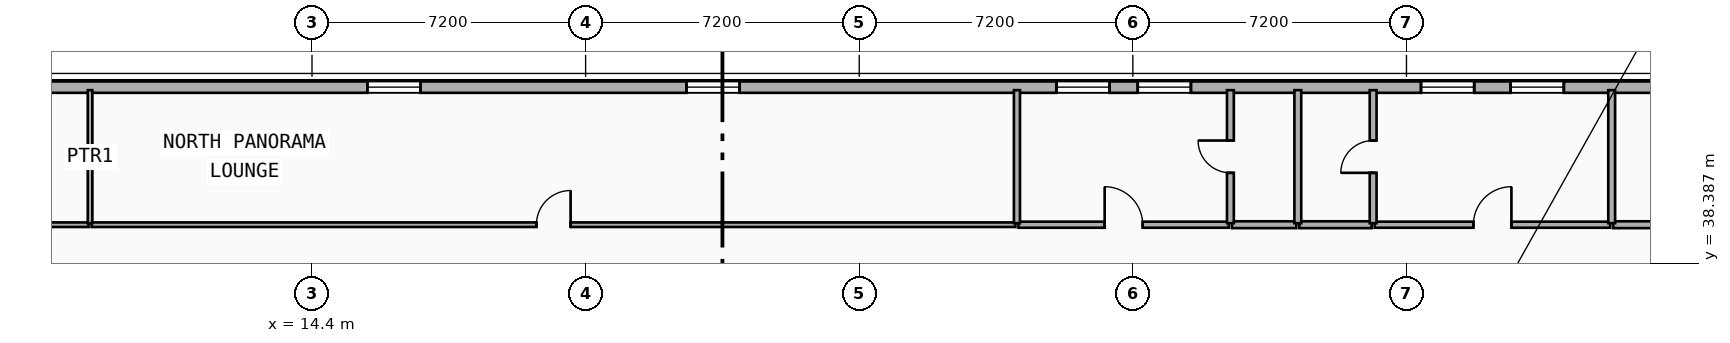
"""IFC4 building model, lengths in metres.
Left out: names, types, materials, properties, quantities, classifications, styles, units other than length and angle.
Written with IfcOpenShell. Run it as: python <this file> out.ifc"""

import sys

from ifc_helpers import new_model, si_unit, direction, frame, frame_2d, origin, place, context, subcontext, project, spatial, rectangle, extrude, element, fill, save


model = new_model("IFC4")
c1 = context("Model", 3, precision=1e-05, world=origin(), true_north=direction((0.0, 1.0)))
c2 = subcontext(c1, "Body", "Model", "MODEL_VIEW")
j1 = project(units=[si_unit("LENGTHUNIT", "METRE"), si_unit("PLANEANGLEUNIT", "RADIAN")], contexts=[c1])
p1 = place(None, origin())
s1 = spatial("IfcSite", under=j1, at=p1, CompositionType="ELEMENT")
p2 = place(p1, origin())
s2 = spatial("IfcBuilding", under=s1, at=p2, CompositionType="ELEMENT")
p3 = place(p2, frame((0.0, 0.0, 101.3)))
s3 = spatial("IfcBuildingStorey", under=s2, at=p3, CompositionType="ELEMENT", Elevation=101.3)
p4 = place(p3, frame((4.2, 43.02, 0.0), z_axis=(0.0, 0.0, 1.0), x_axis=(1.0, 0.0, 0.0)))
e1 = element("IfcWall", 1, at=p4, inside=s3, PredefinedType="SOLIDWALL", context=c2, shape_type="SweptSolid", body=[
    extrude(rectangle(XDim=49.2, YDim=0.3, at=frame_2d((24.6, 0.0))), origin(), (0.0, 0.0, 1.0), 3.24),
])
p5 = place(p4, frame((11.657, 0.0, 0.85)))
e2 = element("IfcOpeningElement", 2, at=p5, cuts=e1, PredefinedType="OPENING", context=c2, shape_type="SweptSolid", body=[
    extrude(rectangle(XDim=1.4, YDim=1.8, at=frame_2d((0.7, 0.9))), frame((0.0, 0.16, 0.0), z_axis=(0.0, -1.0, 0.0), x_axis=(1.0, 0.0, 0.0)), (0.0, 0.0, 1.0), 0.32),
])
p6 = place(p4, frame((20.053, 0.0, 0.85)))
e3 = element("IfcOpeningElement", 3, at=p6, cuts=e1, PredefinedType="OPENING", context=c2, shape_type="SweptSolid", body=[
    extrude(rectangle(XDim=1.4, YDim=1.8, at=frame_2d((0.7, 0.9))), frame((0.0, 0.16, 0.0), z_axis=(0.0, -1.0, 0.0), x_axis=(1.0, 0.0, 0.0)), (0.0, 0.0, 1.0), 0.32),
])
p7 = place(p4, frame((29.789, 0.0, 0.85)))
e4 = element("IfcOpeningElement", 4, at=p7, cuts=e1, PredefinedType="OPENING", context=c2, shape_type="SweptSolid", body=[
    extrude(rectangle(XDim=1.4, YDim=1.8, at=frame_2d((0.7, 0.9))), frame((0.0, 0.16, 0.0), z_axis=(0.0, -1.0, 0.0), x_axis=(1.0, 0.0, 0.0)), (0.0, 0.0, 1.0), 0.32),
])
p8 = place(p4, frame((31.928, 0.0, 0.85)))
e5 = element("IfcOpeningElement", 5, at=p8, cuts=e1, PredefinedType="OPENING", context=c2, shape_type="SweptSolid", body=[
    extrude(rectangle(XDim=1.4, YDim=1.8, at=frame_2d((0.7, 0.9))), frame((0.0, 0.16, 0.0), z_axis=(0.0, -1.0, 0.0), x_axis=(1.0, 0.0, 0.0)), (0.0, 0.0, 1.0), 0.32),
])
p9 = place(p4, frame((39.382, 0.0, 0.85)))
e6 = element("IfcOpeningElement", 6, at=p9, cuts=e1, PredefinedType="OPENING", context=c2, shape_type="SweptSolid", body=[
    extrude(rectangle(XDim=1.4, YDim=1.8, at=frame_2d((0.7, 0.9))), frame((0.0, 0.16, 0.0), z_axis=(0.0, -1.0, 0.0), x_axis=(1.0, 0.0, 0.0)), (0.0, 0.0, 1.0), 0.32),
])
p10 = place(p4, frame((41.741, 0.0, 0.85)))
e7 = element("IfcOpeningElement", 7, at=p10, cuts=e1, PredefinedType="OPENING", context=c2, shape_type="SweptSolid", body=[
    extrude(rectangle(XDim=1.4, YDim=1.8, at=frame_2d((0.7, 0.9))), frame((0.0, 0.16, 0.0), z_axis=(0.0, -1.0, 0.0), x_axis=(1.0, 0.0, 0.0)), (0.0, 0.0, 1.0), 0.32),
])
p11 = place(p4, frame((47.115, 0.0, 0.85)))
e8 = element("IfcOpeningElement", 8, at=p11, cuts=e1, PredefinedType="OPENING", context=c2, shape_type="SweptSolid", body=[
    extrude(rectangle(XDim=1.4, YDim=1.8, at=frame_2d((0.7, 0.9))), frame((0.0, 0.16, 0.0), z_axis=(0.0, -1.0, 0.0), x_axis=(1.0, 0.0, 0.0)), (0.0, 0.0, 1.0), 0.32),
])
p12 = place(p3, frame((0.26, 39.4, 0.0), z_axis=(0.0, 0.0, 1.0), x_axis=(1.0, 0.0, 0.0)))
e9 = element("IfcWall", 9, at=p12, inside=s3, PredefinedType="PARTITIONING", context=c2, shape_type="SweptSolid", body=[
    extrude(rectangle(XDim=8.26, YDim=0.12, at=frame_2d((4.13, 0.0))), origin(), (0.0, 0.0, 1.0), 3.24),
])
p13 = place(p12, frame((3.68, 0.0, 0.0)))
e10 = element("IfcOpeningElement", 10, at=p13, cuts=e9, PredefinedType="OPENING", context=c2, shape_type="SweptSolid", body=[
    extrude(rectangle(XDim=0.9, YDim=2.1, at=frame_2d((0.45, 1.05))), frame((0.0, 0.07, 0.0), z_axis=(0.0, -1.0, 0.0), x_axis=(1.0, 0.0, 0.0)), (0.0, 0.0, 1.0), 0.14),
])
p14 = place(p3, frame((8.6, 39.4, 0.0), z_axis=(0.0, 0.0, 1.0), x_axis=(1.0, 0.0, 0.0)))
e11 = element("IfcWall", 11, at=p14, inside=s3, PredefinedType="PARTITIONING", context=c2, shape_type="SweptSolid", body=[
    extrude(rectangle(XDim=24.31, YDim=0.12, at=frame_2d((12.155, 0.0))), origin(), (0.0, 0.0, 1.0), 3.24),
])
p15 = place(p14, frame((11.705, 0.0, 0.0)))
e12 = element("IfcOpeningElement", 12, at=p15, cuts=e11, PredefinedType="OPENING", context=c2, shape_type="SweptSolid", body=[
    extrude(rectangle(XDim=0.9, YDim=2.1, at=frame_2d((0.45, 1.05))), frame((0.0, 0.07, 0.0), z_axis=(0.0, -1.0, 0.0), x_axis=(1.0, 0.0, 0.0)), (0.0, 0.0, 1.0), 0.14),
])
p16 = place(p3, frame((32.99, 39.4, 0.0), z_axis=(0.0, 0.0, 1.0), x_axis=(1.0, 0.0, 0.0)))
e13 = element("IfcWall", 13, at=p16, inside=s3, PredefinedType="PARTITIONING", context=c2, shape_type="SweptSolid", body=[
    extrude(rectangle(XDim=5.537, YDim=0.16, at=frame_2d((2.769, 0.0))), origin(), (0.0, 0.0, 1.0), 3.24),
])
p17 = place(p16, frame((2.269, 0.0, 0.0)))
e14 = element("IfcOpeningElement", 14, at=p17, cuts=e13, PredefinedType="OPENING", context=c2, shape_type="SweptSolid", body=[
    extrude(rectangle(XDim=1.0, YDim=2.15, at=frame_2d((0.5, 1.075))), frame((0.0, 0.09, 0.0), z_axis=(0.0, -1.0, 0.0), x_axis=(1.0, 0.0, 0.0)), (0.0, 0.0, 1.0), 0.18),
])
p18 = place(p3, frame((38.607, 39.4, 0.0), z_axis=(0.0, 0.0, 1.0), x_axis=(1.0, 0.0, 0.0)))
e15 = element("IfcWall", 15, at=p18, inside=s3, PredefinedType="PLUMBINGWALL", context=c2, shape_type="SweptSolid", body=[
    extrude(rectangle(XDim=1.694, YDim=0.18, at=frame_2d((0.847, 0.0))), origin(), (0.0, 0.0, 1.0), 3.24),
])
p19 = place(p3, frame((42.363, 39.4, 0.0), z_axis=(0.0, 0.0, 1.0), x_axis=(1.0, 0.0, 0.0)))
e16 = element("IfcWall", 16, at=p19, inside=s3, PredefinedType="PARTITIONING", context=c2, shape_type="SweptSolid", body=[
    extrude(rectangle(XDim=6.197, YDim=0.16, at=frame_2d((3.099, 0.0))), origin(), (0.0, 0.0, 1.0), 3.24),
])
p20 = place(p19, frame((2.598, 0.0, 0.0)))
e17 = element("IfcOpeningElement", 17, at=p20, cuts=e16, PredefinedType="OPENING", context=c2, shape_type="SweptSolid", body=[
    extrude(rectangle(XDim=1.0, YDim=2.15, at=frame_2d((0.5, 1.075))), frame((0.0, 0.09, 0.0), z_axis=(0.0, -1.0, 0.0), x_axis=(1.0, 0.0, 0.0)), (0.0, 0.0, 1.0), 0.18),
])
p21 = place(p3, frame((40.381, 39.4, 0.0), z_axis=(0.0, 0.0, 1.0), x_axis=(1.0, 0.0, 0.0)))
e18 = element("IfcWall", 18, at=p21, inside=s3, PredefinedType="PLUMBINGWALL", context=c2, shape_type="SweptSolid", body=[
    extrude(rectangle(XDim=1.902, YDim=0.18, at=frame_2d((0.951, 0.0))), origin(), (0.0, 0.0, 1.0), 3.24),
])
p22 = place(p3, frame((48.64, 39.4, 0.0), z_axis=(0.0, 0.0, 1.0), x_axis=(1.0, 0.0, 0.0)))
e19 = element("IfcWall", 19, at=p22, inside=s3, PredefinedType="PLUMBINGWALL", context=c2, shape_type="SweptSolid", body=[
    extrude(rectangle(XDim=1.97, YDim=0.18, at=frame_2d((0.985, 0.0))), origin(), (0.0, 0.0, 1.0), 3.24),
])
p23 = place(p3, frame((8.56, 39.44, 0.0), z_axis=(0.0, 0.0, 1.0), x_axis=(0.0, 1.0, 0.0)))
e20 = element("IfcWall", 20, at=p23, inside=s3, PredefinedType="PARTITIONING", context=c2, shape_type="SweptSolid", body=[
    extrude(rectangle(XDim=3.5, YDim=0.12, at=frame_2d((1.75, 0.0))), origin(), (0.0, 0.0, 1.0), 3.24),
])
p24 = place(p3, frame((32.95, 39.44, 0.0), z_axis=(0.0, 0.0, 1.0), x_axis=(0.0, 1.0, 0.0)))
e21 = element("IfcWall", 21, at=p24, inside=s3, PredefinedType="PARTITIONING", context=c2, shape_type="SweptSolid", body=[
    extrude(rectangle(XDim=3.5, YDim=0.16, at=frame_2d((1.75, 0.0))), origin(), (0.0, 0.0, 1.0), 3.24),
])
p25 = place(p3, frame((38.567, 39.44, 0.0), z_axis=(0.0, 0.0, 1.0), x_axis=(0.0, 1.0, 0.0)))
e22 = element("IfcWall", 22, at=p25, inside=s3, PredefinedType="PLUMBINGWALL", context=c2, shape_type="SweptSolid", body=[
    extrude(rectangle(XDim=3.5, YDim=0.18, at=frame_2d((1.75, 0.0))), origin(), (0.0, 0.0, 1.0), 3.24),
])
p26 = place(p25, frame((1.325, 0.0, 0.0)))
e23 = element("IfcOpeningElement", 23, at=p26, cuts=e22, PredefinedType="OPENING", context=c2, shape_type="SweptSolid", body=[
    extrude(rectangle(XDim=0.85, YDim=2.1, at=frame_2d((0.425, 1.05))), frame((0.0, 0.1, 0.0), z_axis=(0.0, -1.0, 0.0), x_axis=(1.0, 0.0, 0.0)), (0.0, 0.0, 1.0), 0.2),
])
p27 = place(p3, frame((40.341, 39.44, 0.0), z_axis=(0.0, 0.0, 1.0), x_axis=(0.0, 1.0, 0.0)))
e24 = element("IfcWall", 24, at=p27, inside=s3, PredefinedType="PLUMBINGWALL", context=c2, shape_type="SweptSolid", body=[
    extrude(rectangle(XDim=3.5, YDim=0.18, at=frame_2d((1.75, 0.0))), origin(), (0.0, 0.0, 1.0), 3.24),
])
p28 = place(p3, frame((42.323, 39.44, 0.0), z_axis=(0.0, 0.0, 1.0), x_axis=(0.0, 1.0, 0.0)))
e25 = element("IfcWall", 25, at=p28, inside=s3, PredefinedType="PLUMBINGWALL", context=c2, shape_type="SweptSolid", body=[
    extrude(rectangle(XDim=3.5, YDim=0.18, at=frame_2d((1.75, 0.0))), origin(), (0.0, 0.0, 1.0), 3.24),
])
p29 = place(p28, frame((1.325, 0.0, 0.0)))
e26 = element("IfcOpeningElement", 26, at=p29, cuts=e25, PredefinedType="OPENING", context=c2, shape_type="SweptSolid", body=[
    extrude(rectangle(XDim=0.85, YDim=2.1, at=frame_2d((0.425, 1.05))), frame((0.0, 0.1, 0.0), z_axis=(0.0, -1.0, 0.0), x_axis=(1.0, 0.0, 0.0)), (0.0, 0.0, 1.0), 0.2),
])
p30 = place(p3, frame((48.6, 39.44, 0.0), z_axis=(0.0, 0.0, 1.0), x_axis=(0.0, 1.0, 0.0)))
e27 = element("IfcWall", 27, at=p30, inside=s3, PredefinedType="PLUMBINGWALL", context=c2, shape_type="SweptSolid", body=[
    extrude(rectangle(XDim=3.5, YDim=0.18, at=frame_2d((1.75, 0.0))), origin(), (0.0, 0.0, 1.0), 3.24),
])
p31 = place(p5, origin())
e28 = element("IfcWindow", 28, at=p31, inside=s3, PartitioningType="SINGLE_PANEL", PredefinedType="WINDOW", context=c2, shape_type="SweptSolid", body=[
    extrude(rectangle(XDim=1.4, YDim=1.8, at=frame_2d((0.7, 0.9))), frame((0.0, 0.03, 0.0), z_axis=(0.0, -1.0, 0.0), x_axis=(1.0, 0.0, 0.0)), (0.0, 0.0, 1.0), 0.06),
])
fill(e2, e28)
p32 = place(p6, origin())
e29 = element("IfcWindow", 29, at=p32, inside=s3, PartitioningType="SINGLE_PANEL", PredefinedType="WINDOW", context=c2, shape_type="SweptSolid", body=[
    extrude(rectangle(XDim=1.4, YDim=1.8, at=frame_2d((0.7, 0.9))), frame((0.0, 0.03, 0.0), z_axis=(0.0, -1.0, 0.0), x_axis=(1.0, 0.0, 0.0)), (0.0, 0.0, 1.0), 0.06),
])
fill(e3, e29)
p33 = place(p7, origin())
e30 = element("IfcWindow", 30, at=p33, inside=s3, PartitioningType="SINGLE_PANEL", PredefinedType="WINDOW", context=c2, shape_type="SweptSolid", body=[
    extrude(rectangle(XDim=1.4, YDim=1.8, at=frame_2d((0.7, 0.9))), frame((0.0, 0.03, 0.0), z_axis=(0.0, -1.0, 0.0), x_axis=(1.0, 0.0, 0.0)), (0.0, 0.0, 1.0), 0.06),
])
fill(e4, e30)
p34 = place(p8, origin())
e31 = element("IfcWindow", 31, at=p34, inside=s3, PartitioningType="SINGLE_PANEL", PredefinedType="WINDOW", context=c2, shape_type="SweptSolid", body=[
    extrude(rectangle(XDim=1.4, YDim=1.8, at=frame_2d((0.7, 0.9))), frame((0.0, 0.03, 0.0), z_axis=(0.0, -1.0, 0.0), x_axis=(1.0, 0.0, 0.0)), (0.0, 0.0, 1.0), 0.06),
])
fill(e5, e31)
p35 = place(p9, origin())
e32 = element("IfcWindow", 32, at=p35, inside=s3, PartitioningType="SINGLE_PANEL", PredefinedType="WINDOW", context=c2, shape_type="SweptSolid", body=[
    extrude(rectangle(XDim=1.4, YDim=1.8, at=frame_2d((0.7, 0.9))), frame((0.0, 0.03, 0.0), z_axis=(0.0, -1.0, 0.0), x_axis=(1.0, 0.0, 0.0)), (0.0, 0.0, 1.0), 0.06),
])
fill(e6, e32)
p36 = place(p10, origin())
e33 = element("IfcWindow", 33, at=p36, inside=s3, PartitioningType="SINGLE_PANEL", PredefinedType="WINDOW", context=c2, shape_type="SweptSolid", body=[
    extrude(rectangle(XDim=1.4, YDim=1.8, at=frame_2d((0.7, 0.9))), frame((0.0, 0.03, 0.0), z_axis=(0.0, -1.0, 0.0), x_axis=(1.0, 0.0, 0.0)), (0.0, 0.0, 1.0), 0.06),
])
fill(e7, e33)
p37 = place(p15, origin())
e34 = element("IfcDoor", 34, at=p37, inside=s3, OperationType="SINGLE_SWING_RIGHT", PredefinedType="DOOR", context=c2, shape_type="SweptSolid", body=[
    extrude(rectangle(XDim=0.9, YDim=2.1, at=frame_2d((0.45, 1.05))), frame((0.0, 0.025, 0.0), z_axis=(0.0, -1.0, 0.0), x_axis=(1.0, 0.0, 0.0)), (0.0, 0.0, 1.0), 0.05),
])
fill(e12, e34)
p38 = place(p17, origin())
e35 = element("IfcDoor", 35, at=p38, inside=s3, OperationType="SINGLE_SWING_LEFT", PredefinedType="DOOR", context=c2, shape_type="SweptSolid", body=[
    extrude(rectangle(XDim=1.0, YDim=2.15, at=frame_2d((0.5, 1.075))), frame((0.0, 0.025, 0.0), z_axis=(0.0, -1.0, 0.0), x_axis=(1.0, 0.0, 0.0)), (0.0, 0.0, 1.0), 0.05),
])
fill(e14, e35)
p39 = place(p20, origin())
e36 = element("IfcDoor", 36, at=p39, inside=s3, OperationType="SINGLE_SWING_RIGHT", PredefinedType="DOOR", context=c2, shape_type="SweptSolid", body=[
    extrude(rectangle(XDim=1.0, YDim=2.15, at=frame_2d((0.5, 1.075))), frame((0.0, 0.025, 0.0), z_axis=(0.0, -1.0, 0.0), x_axis=(1.0, 0.0, 0.0)), (0.0, 0.0, 1.0), 0.05),
])
fill(e17, e36)
p40 = place(p26, origin())
e37 = element("IfcDoor", 37, at=p40, inside=s3, OperationType="SINGLE_SWING_RIGHT", PredefinedType="DOOR", context=c2, shape_type="SweptSolid", body=[
    extrude(rectangle(XDim=0.85, YDim=2.1, at=frame_2d((0.425, 1.05))), frame((0.0, 0.025, 0.0), z_axis=(0.0, -1.0, 0.0), x_axis=(1.0, 0.0, 0.0)), (0.0, 0.0, 1.0), 0.05),
])
fill(e23, e37)
p41 = place(p29, origin())
e38 = element("IfcDoor", 38, at=p41, inside=s3, OperationType="SINGLE_SWING_LEFT", PredefinedType="DOOR", context=c2, shape_type="SweptSolid", body=[
    extrude(rectangle(XDim=0.85, YDim=2.1, at=frame_2d((0.425, 1.05))), frame((0.0, 0.025, 0.0), z_axis=(0.0, -1.0, 0.0), x_axis=(1.0, 0.0, 0.0)), (0.0, 0.0, 1.0), 0.05),
])
fill(e26, e38)
save(model, sys.argv[1])
